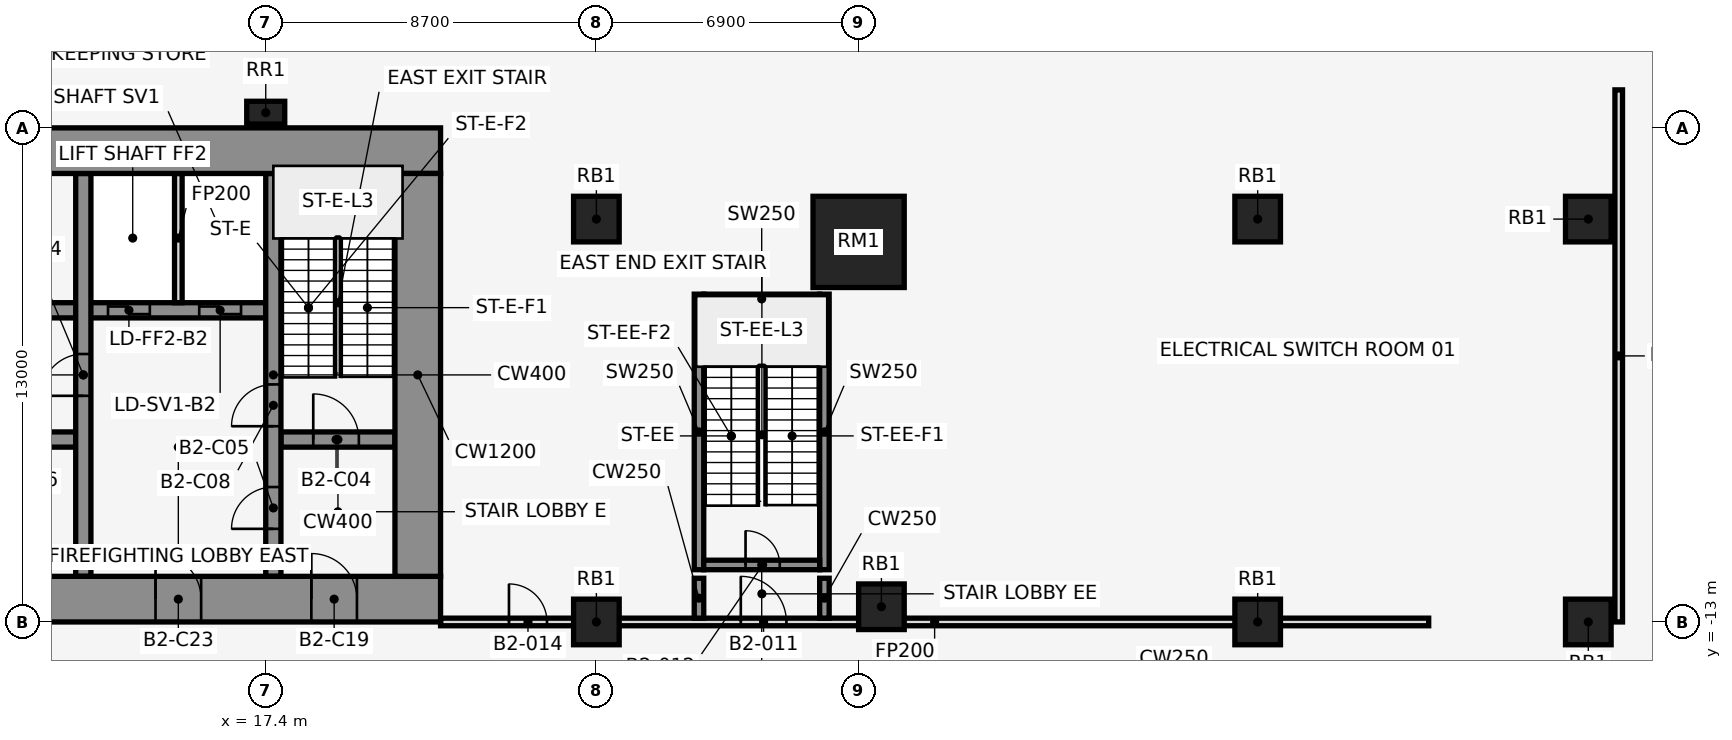
"""IFC4 building model, lengths in metres.
Left out: names, types, materials, properties, quantities, classifications, styles, units other than length and angle.
Written with IfcOpenShell. Run it as: python <this file> out.ifc"""

import sys

from ifc_helpers import new_model, si_unit, direction, frame, frame_2d, origin, origin_2d, place, context, subcontext, project, spatial, rectangle, extrude, element, fill, save


model = new_model("IFC4")
c1 = context("Model", 3, precision=1e-05, world=origin(), true_north=direction((0.0, 1.0)))
c2 = subcontext(c1, "Body", "Model", "MODEL_VIEW")
j1 = project(units=[si_unit("LENGTHUNIT", "METRE"), si_unit("PLANEANGLEUNIT", "RADIAN")], contexts=[c1])
p1 = place(None, origin())
s1 = spatial("IfcSite", under=j1, at=p1, CompositionType="ELEMENT")
p2 = place(p1, origin())
s2 = spatial("IfcBuilding", under=s1, at=p2, CompositionType="ELEMENT")
p3 = place(p2, frame((0.0, 0.0, -10.0)))
s3 = spatial("IfcBuildingStorey", under=s2, at=p3, CompositionType="ELEMENT", Elevation=-10.0)
p4 = place(p3, frame((26.1, -2.4, 0.0), z_axis=(0.0, 0.0, 1.0), x_axis=(1.0, 0.0, 0.0)))
e1 = element("IfcColumn", 1, at=p4, inside=s3, PredefinedType="COLUMN", context=c2, shape_type="SweptSolid", body=[
    extrude(rectangle(XDim=1.2, YDim=1.2, at=origin_2d()), origin(), (0.0, 0.0, 1.0), 5.0),
])
p5 = place(p3, frame((33.0, -3.0, 0.0), z_axis=(0.0, 0.0, 1.0), x_axis=(1.0, 0.0, 0.0)))
e2 = element("IfcColumn", 2, at=p5, inside=s3, PredefinedType="COLUMN", context=c2, shape_type="SweptSolid", body=[
    extrude(rectangle(XDim=2.4, YDim=2.4, at=origin_2d()), origin(), (0.0, 0.0, 1.0), 5.0),
])
p6 = place(p3, frame((17.4, 0.4, 0.0), z_axis=(0.0, 0.0, 1.0), x_axis=(1.0, 0.0, 0.0)))
e3 = element("IfcColumn", 3, at=p6, inside=s3, PredefinedType="COLUMN", context=c2, shape_type="SweptSolid", body=[
    extrude(rectangle(XDim=1.0, YDim=0.6, at=origin_2d()), origin(), (0.0, 0.0, 1.0), 5.0),
])
for number, where, z_axis, x_axis in (
    (4, (33.6, -12.6, 0.0), (0.0, 0.0, 1.0), (1.0, 0.0, 0.0)),
    (5, (26.1, -13.0, 0.0), (0.0, 0.0, 1.0), (1.0, 0.0, 0.0)),
    (6, (43.5, -2.4, 0.0), (0.0, 0.0, 1.0), (1.0, 0.0, 0.0)),
    (7, (43.5, -13.0, 0.0), (0.0, 0.0, 1.0), (1.0, 0.0, 0.0)),
    (8, (52.2, -2.4, 0.0), (0.0, 0.0, 1.0), (1.0, 0.0, 0.0)),
    (9, (52.2, -13.0, 0.0), (0.0, 0.0, 1.0), (1.0, 0.0, 0.0)),
):
    element("IfcColumn", number, at=place(p3, frame(where, z_axis=z_axis, x_axis=x_axis)), inside=s3, PredefinedType="COLUMN", context=c2, shape_type="SweptSolid", body=[
        extrude(rectangle(XDim=1.2, YDim=1.2, at=origin_2d()), origin(), (0.0, 0.0, 1.0), 5.0),
    ])
for number, where, z_axis, x_axis in (
    (10, (28.8, -11.625, 0.0), (0.0, 0.0, 1.0), (0.0, 1.0, 0.0)),
    (11, (32.1, -11.625, 0.0), (0.0, 0.0, 1.0), (0.0, 1.0, 0.0)),
):
    element("IfcWall", number, at=place(p3, frame(where, z_axis=z_axis, x_axis=x_axis)), inside=s3, PredefinedType="SHEAR", context=c2, shape_type="SweptSolid", body=[
        extrude(rectangle(XDim=7.25, YDim=0.25, at=frame_2d((3.625, 0.0))), origin(), (0.0, 0.0, 1.0), 5.0),
    ])
p7 = place(p3, frame((28.925, -11.5, 0.0), z_axis=(0.0, 0.0, 1.0), x_axis=(1.0, 0.0, 0.0)))
e12 = element("IfcWall", 12, at=p7, inside=s3, PredefinedType="SHEAR", context=c2, shape_type="SweptSolid", body=[
    extrude(rectangle(XDim=3.05, YDim=0.25, at=frame_2d((1.525, 0.0))), origin(), (0.0, 0.0, 1.0), 5.0),
])
p8 = place(p7, frame((1.1, 0.0, 0.0)))
e13 = element("IfcOpeningElement", 13, at=p8, cuts=e12, PredefinedType="OPENING", context=c2, shape_type="SweptSolid", body=[
    extrude(rectangle(XDim=0.9, YDim=2.1, at=frame_2d((0.45, 1.05))), frame((0.0, 0.137, 0.0), z_axis=(0.0, -1.0, 0.0), x_axis=(1.0, 0.0, 0.0)), (0.0, 0.0, 1.0), 0.274),
])
p9 = place(p3, frame((28.925, -4.5, 0.0), z_axis=(0.0, 0.0, 1.0), x_axis=(1.0, 0.0, 0.0)))
e14 = element("IfcWall", 14, at=p9, inside=s3, PredefinedType="SHEAR", context=c2, shape_type="SweptSolid", body=[
    extrude(rectangle(XDim=3.05, YDim=0.25, at=frame_2d((1.525, 0.0))), origin(), (0.0, 0.0, 1.0), 5.0),
])
p10 = place(p3, frame((22.0, -13.0, 0.0), z_axis=(0.0, 0.0, 1.0), x_axis=(1.0, 0.0, 0.0)))
e15 = element("IfcWall", 15, at=p10, inside=s3, PredefinedType="PARTITIONING", context=c2, shape_type="SweptSolid", body=[
    extrude(rectangle(XDim=26.0, YDim=0.2, at=frame_2d((13.0, 0.0))), origin(), (0.0, 0.0, 1.0), 4.7),
])
p11 = place(p10, frame((7.9, 0.0, 0.0)))
e16 = element("IfcOpeningElement", 16, at=p11, cuts=e15, PredefinedType="OPENING", context=c2, shape_type="SweptSolid", body=[
    extrude(rectangle(XDim=1.2, YDim=2.1, at=frame_2d((0.6, 1.05))), frame((0.0, 0.112, 0.0), z_axis=(0.0, -1.0, 0.0), x_axis=(1.0, 0.0, 0.0)), (0.0, 0.0, 1.0), 0.224),
])
p12 = place(p10, frame((1.8, 0.0, 0.0)))
e17 = element("IfcOpeningElement", 17, at=p12, cuts=e15, PredefinedType="OPENING", context=c2, shape_type="SweptSolid", body=[
    extrude(rectangle(XDim=1.0, YDim=2.1, at=frame_2d((0.5, 1.05))), frame((0.0, 0.112, 0.0), z_axis=(0.0, -1.0, 0.0), x_axis=(1.0, 0.0, 0.0)), (0.0, 0.0, 1.0), 0.224),
])
for number, where, z_axis, x_axis in (
    (18, (28.8, -12.9, 0.0), (0.0, 0.0, 1.0), (0.0, 1.0, 0.0)),
    (19, (32.1, -12.9, 0.0), (0.0, 0.0, 1.0), (0.0, 1.0, 0.0)),
):
    element("IfcWall", number, at=place(p3, frame(where, z_axis=z_axis, x_axis=x_axis)), inside=s3, PredefinedType="SHEAR", context=c2, shape_type="SweptSolid", body=[
        extrude(rectangle(XDim=1.05, YDim=0.25, at=frame_2d((0.525, 0.0))), origin(), (0.0, 0.0, 1.0), 5.0),
    ])
p13 = place(p3, frame((53.0, -13.0, 0.0), z_axis=(0.0, 0.0, 1.0), x_axis=(0.0, 1.0, 0.0)))
e20 = element("IfcWall", 20, at=p13, inside=s3, PredefinedType="PARTITIONING", context=c2, shape_type="SweptSolid", body=[
    extrude(rectangle(XDim=14.0, YDim=0.2, at=frame_2d((7.0, 0.0))), origin(), (0.0, 0.0, 1.0), 4.7),
])
p14 = place(p3, frame((6.4, -8.2, 0.0), z_axis=(0.0, 0.0, 1.0), x_axis=(1.0, 0.0, 0.0)))
e21 = element("IfcWall", 21, at=p14, inside=s3, PredefinedType="SHEAR", context=c2, shape_type="SweptSolid", body=[
    extrude(rectangle(XDim=6.0, YDim=0.4, at=frame_2d((3.0, 0.0))), origin(), (0.0, 0.0, 1.0), 5.0),
])
p15 = place(p14, frame((4.15, 0.0, 0.0)))
e22 = element("IfcOpeningElement", 22, at=p15, cuts=e21, PredefinedType="OPENING", context=c2, shape_type="SweptSolid", body=[
    extrude(rectangle(XDim=0.9, YDim=2.1, at=frame_2d((0.45, 1.05))), frame((0.0, 0.212, 0.0), z_axis=(0.0, -1.0, 0.0), x_axis=(1.0, 0.0, 0.0)), (0.0, 0.0, 1.0), 0.424),
])
p16 = place(p3, frame((17.8, -8.2, 0.0), z_axis=(0.0, 0.0, 1.0), x_axis=(1.0, 0.0, 0.0)))
e23 = element("IfcWall", 23, at=p16, inside=s3, PredefinedType="SHEAR", context=c2, shape_type="SweptSolid", body=[
    extrude(rectangle(XDim=3.0, YDim=0.4, at=frame_2d((1.5, 0.0))), origin(), (0.0, 0.0, 1.0), 5.0),
])
p17 = place(p16, frame((0.85, 0.0, 0.0)))
e24 = element("IfcOpeningElement", 24, at=p17, cuts=e23, PredefinedType="OPENING", context=c2, shape_type="SweptSolid", body=[
    extrude(rectangle(XDim=1.2, YDim=2.1, at=frame_2d((0.6, 1.05))), frame((0.0, 0.212, 0.0), z_axis=(0.0, -1.0, 0.0), x_axis=(1.0, 0.0, 0.0)), (0.0, 0.0, 1.0), 0.424),
])
p18 = place(p3, frame((3.8, -4.8, 0.0), z_axis=(0.0, 0.0, 1.0), x_axis=(1.0, 0.0, 0.0)))
e25 = element("IfcWall", 25, at=p18, inside=s3, PredefinedType="SHEAR", context=c2, shape_type="SweptSolid", body=[
    extrude(rectangle(XDim=13.6, YDim=0.4, at=frame_2d((6.8, 0.0))), origin(), (0.0, 0.0, 1.0), 5.0),
])
p19 = place(p18, frame((9.45, 0.0, 0.0)))
e26 = element("IfcOpeningElement", 26, at=p19, cuts=e25, PredefinedType="OPENING", context=c2, shape_type="SweptSolid", body=[
    extrude(rectangle(XDim=1.1, YDim=2.1, at=frame_2d((0.55, 1.05))), frame((0.0, 0.212, 0.0), z_axis=(0.0, -1.0, 0.0), x_axis=(1.0, 0.0, 0.0)), (0.0, 0.0, 1.0), 0.424),
])
p20 = place(p18, frame((11.85, 0.0, 0.0)))
e27 = element("IfcOpeningElement", 27, at=p20, cuts=e25, PredefinedType="OPENING", context=c2, shape_type="SweptSolid", body=[
    extrude(rectangle(XDim=1.1, YDim=2.1, at=frame_2d((0.55, 1.05))), frame((0.0, 0.212, 0.0), z_axis=(0.0, -1.0, 0.0), x_axis=(1.0, 0.0, 0.0)), (0.0, 0.0, 1.0), 0.424),
])
p21 = place(p18, frame((0.95, 0.0, 0.0)))
e28 = element("IfcOpeningElement", 28, at=p21, cuts=e25, PredefinedType="OPENING", context=c2, shape_type="SweptSolid", body=[
    extrude(rectangle(XDim=0.9, YDim=2.1, at=frame_2d((0.45, 1.05))), frame((0.0, 0.212, 0.0), z_axis=(0.0, -1.0, 0.0), x_axis=(1.0, 0.0, 0.0)), (0.0, 0.0, 1.0), 0.424),
])
p22 = place(p18, frame((3.85, 0.0, 0.0)))
e29 = element("IfcOpeningElement", 29, at=p22, cuts=e25, PredefinedType="OPENING", context=c2, shape_type="SweptSolid", body=[
    extrude(rectangle(XDim=0.9, YDim=2.1, at=frame_2d((0.45, 1.05))), frame((0.0, 0.212, 0.0), z_axis=(0.0, -1.0, 0.0), x_axis=(1.0, 0.0, 0.0)), (0.0, 0.0, 1.0), 0.424),
])
p23 = place(p18, frame((6.85, 0.0, 0.0)))
e30 = element("IfcOpeningElement", 30, at=p23, cuts=e25, PredefinedType="OPENING", context=c2, shape_type="SweptSolid", body=[
    extrude(rectangle(XDim=0.9, YDim=2.1, at=frame_2d((0.45, 1.05))), frame((0.0, 0.212, 0.0), z_axis=(0.0, -1.0, 0.0), x_axis=(1.0, 0.0, 0.0)), (0.0, 0.0, 1.0), 0.424),
])
p24 = place(p3, frame((12.6, -11.8, 0.0), z_axis=(0.0, 0.0, 1.0), x_axis=(0.0, 1.0, 0.0)))
e31 = element("IfcWall", 31, at=p24, inside=s3, PredefinedType="SHEAR", context=c2, shape_type="SweptSolid", body=[
    extrude(rectangle(XDim=10.6, YDim=0.4, at=frame_2d((5.3, 0.0))), origin(), (0.0, 0.0, 1.0), 5.0),
])
p25 = place(p24, frame((4.75, 0.0, 0.0)))
e32 = element("IfcOpeningElement", 32, at=p25, cuts=e31, PredefinedType="OPENING", context=c2, shape_type="SweptSolid", body=[
    extrude(rectangle(XDim=1.1, YDim=2.1, at=frame_2d((0.55, 1.05))), frame((0.0, 0.212, 0.0), z_axis=(0.0, -1.0, 0.0), x_axis=(1.0, 0.0, 0.0)), (0.0, 0.0, 1.0), 0.424),
])
p26 = place(p3, frame((15.1, -4.6, 0.0), z_axis=(0.0, 0.0, 1.0), x_axis=(0.0, 1.0, 0.0)))
e33 = element("IfcWall", 33, at=p26, inside=s3, PredefinedType="PARTITIONING", context=c2, shape_type="SweptSolid", body=[
    extrude(rectangle(XDim=3.4, YDim=0.2, at=frame_2d((1.7, 0.0))), origin(), (0.0, 0.0, 1.0), 4.7),
])
p27 = place(p3, frame((17.6, -11.8, 0.0), z_axis=(0.0, 0.0, 1.0), x_axis=(0.0, 1.0, 0.0)))
e34 = element("IfcWall", 34, at=p27, inside=s3, PredefinedType="SHEAR", context=c2, shape_type="SweptSolid", body=[
    extrude(rectangle(XDim=10.6, YDim=0.4, at=frame_2d((5.3, 0.0))), origin(), (0.0, 0.0, 1.0), 5.0),
])
p28 = place(p27, frame((1.25, 0.0, 0.0)))
e35 = element("IfcOpeningElement", 35, at=p28, cuts=e34, PredefinedType="OPENING", context=c2, shape_type="SweptSolid", body=[
    extrude(rectangle(XDim=1.1, YDim=2.1, at=frame_2d((0.55, 1.05))), frame((0.0, 0.212, 0.0), z_axis=(0.0, -1.0, 0.0), x_axis=(1.0, 0.0, 0.0)), (0.0, 0.0, 1.0), 0.424),
])
p29 = place(p27, frame((3.95, 0.0, 0.0)))
e36 = element("IfcOpeningElement", 36, at=p29, cuts=e34, PredefinedType="OPENING", context=c2, shape_type="SweptSolid", body=[
    extrude(rectangle(XDim=1.1, YDim=2.1, at=frame_2d((0.55, 1.05))), frame((0.0, 0.212, 0.0), z_axis=(0.0, -1.0, 0.0), x_axis=(1.0, 0.0, 0.0)), (0.0, 0.0, 1.0), 0.424),
])
p30 = place(p3, frame((-22.0, -0.6, 0.0), z_axis=(0.0, 0.0, 1.0), x_axis=(1.0, 0.0, 0.0)))
e37 = element("IfcWall", 37, at=p30, inside=s3, PredefinedType="SHEAR", context=c2, shape_type="SweptSolid", body=[
    extrude(rectangle(XDim=44.0, YDim=1.2, at=frame_2d((22.0, 0.0))), origin(), (0.0, 0.0, 1.0), 5.0),
])
p31 = place(p3, frame((-22.0, -12.4, 0.0), z_axis=(0.0, 0.0, 1.0), x_axis=(1.0, 0.0, 0.0)))
e38 = element("IfcWall", 38, at=p31, inside=s3, PredefinedType="SHEAR", context=c2, shape_type="SweptSolid", body=[
    extrude(rectangle(XDim=44.0, YDim=1.2, at=frame_2d((22.0, 0.0))), origin(), (0.0, 0.0, 1.0), 5.0),
])
p32 = place(p31, frame((2.2, 0.0, 0.0)))
e39 = element("IfcOpeningElement", 39, at=p32, cuts=e38, PredefinedType="OPENING", context=c2, shape_type="SweptSolid", body=[
    extrude(rectangle(XDim=1.2, YDim=2.1, at=frame_2d((0.6, 1.05))), frame((0.0, 0.612, 0.0), z_axis=(0.0, -1.0, 0.0), x_axis=(1.0, 0.0, 0.0)), (0.0, 0.0, 1.0), 1.224),
])
p33 = place(p31, frame((21.4, 0.0, 0.0)))
e40 = element("IfcOpeningElement", 40, at=p33, cuts=e38, PredefinedType="OPENING", context=c2, shape_type="SweptSolid", body=[
    extrude(rectangle(XDim=1.2, YDim=2.1, at=frame_2d((0.6, 1.05))), frame((0.0, 0.612, 0.0), z_axis=(0.0, -1.0, 0.0), x_axis=(1.0, 0.0, 0.0)), (0.0, 0.0, 1.0), 1.224),
])
p34 = place(p31, frame((40.6, 0.0, 0.0)))
e41 = element("IfcOpeningElement", 41, at=p34, cuts=e38, PredefinedType="OPENING", context=c2, shape_type="SweptSolid", body=[
    extrude(rectangle(XDim=1.2, YDim=2.1, at=frame_2d((0.6, 1.05))), frame((0.0, 0.612, 0.0), z_axis=(0.0, -1.0, 0.0), x_axis=(1.0, 0.0, 0.0)), (0.0, 0.0, 1.0), 1.224),
])
p35 = place(p31, frame((16.0, 0.0, 0.0)))
e42 = element("IfcOpeningElement", 42, at=p35, cuts=e38, PredefinedType="OPENING", context=c2, shape_type="SweptSolid", body=[
    extrude(rectangle(XDim=1.8, YDim=2.1, at=frame_2d((0.9, 1.05))), frame((0.0, 0.612, 0.0), z_axis=(0.0, -1.0, 0.0), x_axis=(1.0, 0.0, 0.0)), (0.0, 0.0, 1.0), 1.224),
])
p36 = place(p31, frame((6.3, 0.0, 0.0)))
e43 = element("IfcOpeningElement", 43, at=p36, cuts=e38, PredefinedType="OPENING", context=c2, shape_type="SweptSolid", body=[
    extrude(rectangle(XDim=1.2, YDim=2.1, at=frame_2d((0.6, 1.05))), frame((0.0, 0.612, 0.0), z_axis=(0.0, -1.0, 0.0), x_axis=(1.0, 0.0, 0.0)), (0.0, 0.0, 1.0), 1.224),
])
p37 = place(p31, frame((26.2, 0.0, 0.0)))
e44 = element("IfcOpeningElement", 44, at=p37, cuts=e38, PredefinedType="OPENING", context=c2, shape_type="SweptSolid", body=[
    extrude(rectangle(XDim=1.8, YDim=2.1, at=frame_2d((0.9, 1.05))), frame((0.0, 0.612, 0.0), z_axis=(0.0, -1.0, 0.0), x_axis=(1.0, 0.0, 0.0)), (0.0, 0.0, 1.0), 1.224),
])
p38 = place(p31, frame((36.5, 0.0, 0.0)))
e45 = element("IfcOpeningElement", 45, at=p38, cuts=e38, PredefinedType="OPENING", context=c2, shape_type="SweptSolid", body=[
    extrude(rectangle(XDim=1.2, YDim=2.1, at=frame_2d((0.6, 1.05))), frame((0.0, 0.612, 0.0), z_axis=(0.0, -1.0, 0.0), x_axis=(1.0, 0.0, 0.0)), (0.0, 0.0, 1.0), 1.224),
])
p39 = place(p3, frame((21.4, -11.8, 0.0), z_axis=(0.0, 0.0, 1.0), x_axis=(0.0, 1.0, 0.0)))
e46 = element("IfcWall", 46, at=p39, inside=s3, PredefinedType="SHEAR", context=c2, shape_type="SweptSolid", body=[
    extrude(rectangle(XDim=10.6, YDim=1.2, at=frame_2d((5.3, 0.0))), origin(), (0.0, 0.0, 1.0), 5.0),
])
p40 = place(p11, origin())
e47 = element("IfcDoor", 47, at=p40, inside=s3, OperationType="SINGLE_SWING_LEFT", PredefinedType="DOOR", context=c2, shape_type="SweptSolid", body=[
    extrude(rectangle(XDim=1.2, YDim=2.1, at=frame_2d((0.6, 1.05))), frame((0.0, 0.025, 0.0), z_axis=(0.0, -1.0, 0.0), x_axis=(1.0, 0.0, 0.0)), (0.0, 0.0, 1.0), 0.05),
])
fill(e16, e47)
p41 = place(p8, origin())
e48 = element("IfcDoor", 48, at=p41, inside=s3, OperationType="SINGLE_SWING_RIGHT", PredefinedType="DOOR", context=c2, shape_type="SweptSolid", body=[
    extrude(rectangle(XDim=0.9, YDim=2.1, at=frame_2d((0.45, 1.05))), frame((0.0, 0.025, 0.0), z_axis=(0.0, -1.0, 0.0), x_axis=(1.0, 0.0, 0.0)), (0.0, 0.0, 1.0), 0.05),
])
fill(e13, e48)
p42 = place(p12, origin())
e49 = element("IfcDoor", 49, at=p42, inside=s3, OperationType="SINGLE_SWING_LEFT", PredefinedType="DOOR", context=c2, shape_type="SweptSolid", body=[
    extrude(rectangle(XDim=1.0, YDim=2.1, at=frame_2d((0.5, 1.05))), frame((0.0, 0.025, 0.0), z_axis=(0.0, -1.0, 0.0), x_axis=(1.0, 0.0, 0.0)), (0.0, 0.0, 1.0), 0.05),
])
fill(e17, e49)
p43 = place(p17, origin())
e50 = element("IfcDoor", 50, at=p43, inside=s3, OperationType="SINGLE_SWING_RIGHT", PredefinedType="DOOR", context=c2, shape_type="SweptSolid", body=[
    extrude(rectangle(XDim=1.2, YDim=2.1, at=frame_2d((0.6, 1.05))), frame((0.0, 0.025, 0.0), z_axis=(0.0, -1.0, 0.0), x_axis=(1.0, 0.0, 0.0)), (0.0, 0.0, 1.0), 0.05),
])
fill(e24, e50)
p44 = place(p28, origin())
e51 = element("IfcDoor", 51, at=p44, inside=s3, OperationType="SINGLE_SWING_LEFT", PredefinedType="DOOR", context=c2, shape_type="SweptSolid", body=[
    extrude(rectangle(XDim=1.1, YDim=2.1, at=frame_2d((0.55, 1.05))), frame((0.0, 0.025, 0.0), z_axis=(0.0, -1.0, 0.0), x_axis=(1.0, 0.0, 0.0)), (0.0, 0.0, 1.0), 0.05),
])
fill(e35, e51)
p45 = place(p19, origin())
e52 = element("IfcDoor", 52, at=p45, inside=s3, OperationType="DOUBLE_DOOR_SLIDING", PredefinedType="DOOR", context=c2, shape_type="SweptSolid", body=[
    extrude(rectangle(XDim=1.1, YDim=2.1, at=frame_2d((0.55, 1.05))), frame((0.0, 0.025, 0.0), z_axis=(0.0, -1.0, 0.0), x_axis=(1.0, 0.0, 0.0)), (0.0, 0.0, 1.0), 0.05),
])
fill(e26, e52)
p46 = place(p20, origin())
e53 = element("IfcDoor", 53, at=p46, inside=s3, OperationType="DOUBLE_DOOR_SLIDING", PredefinedType="DOOR", context=c2, shape_type="SweptSolid", body=[
    extrude(rectangle(XDim=1.1, YDim=2.1, at=frame_2d((0.55, 1.05))), frame((0.0, 0.025, 0.0), z_axis=(0.0, -1.0, 0.0), x_axis=(1.0, 0.0, 0.0)), (0.0, 0.0, 1.0), 0.05),
])
fill(e27, e53)
p47 = place(p29, origin())
e54 = element("IfcDoor", 54, at=p47, inside=s3, OperationType="SINGLE_SWING_RIGHT", PredefinedType="DOOR", context=c2, shape_type="SweptSolid", body=[
    extrude(rectangle(XDim=1.1, YDim=2.1, at=frame_2d((0.55, 1.05))), frame((0.0, 0.025, 0.0), z_axis=(0.0, -1.0, 0.0), x_axis=(1.0, 0.0, 0.0)), (0.0, 0.0, 1.0), 0.05),
])
fill(e36, e54)
p48 = place(p25, frame((1.1, 0.0, 0.0), z_axis=(0.0, 0.0, 1.0), x_axis=(-1.0, 0.0, 0.0)))
e55 = element("IfcDoor", 55, at=p48, inside=s3, OperationType="SINGLE_SWING_RIGHT", PredefinedType="DOOR", context=c2, shape_type="SweptSolid", body=[
    extrude(rectangle(XDim=1.1, YDim=2.1, at=frame_2d((0.55, 1.05))), frame((0.0, 0.025, 0.0), z_axis=(0.0, -1.0, 0.0), x_axis=(1.0, 0.0, 0.0)), (0.0, 0.0, 1.0), 0.05),
])
fill(e32, e55)
p49 = place(p34, frame((1.2, 0.0, 0.0), z_axis=(0.0, 0.0, 1.0), x_axis=(-1.0, 0.0, 0.0)))
e56 = element("IfcDoor", 56, at=p49, inside=s3, OperationType="SINGLE_SWING_RIGHT", PredefinedType="DOOR", context=c2, shape_type="SweptSolid", body=[
    extrude(rectangle(XDim=1.2, YDim=2.1, at=frame_2d((0.6, 1.05))), frame((0.0, 0.025, 0.0), z_axis=(0.0, -1.0, 0.0), x_axis=(1.0, 0.0, 0.0)), (0.0, 0.0, 1.0), 0.05),
])
fill(e41, e56)
p50 = place(p38, frame((1.2, 0.0, 0.0), z_axis=(0.0, 0.0, 1.0), x_axis=(-1.0, 0.0, 0.0)))
e57 = element("IfcDoor", 57, at=p50, inside=s3, OperationType="SINGLE_SWING_RIGHT", PredefinedType="DOOR", context=c2, shape_type="SweptSolid", body=[
    extrude(rectangle(XDim=1.2, YDim=2.1, at=frame_2d((0.6, 1.05))), frame((0.0, 0.025, 0.0), z_axis=(0.0, -1.0, 0.0), x_axis=(1.0, 0.0, 0.0)), (0.0, 0.0, 1.0), 0.05),
])
fill(e45, e57)
save(model, sys.argv[1])
